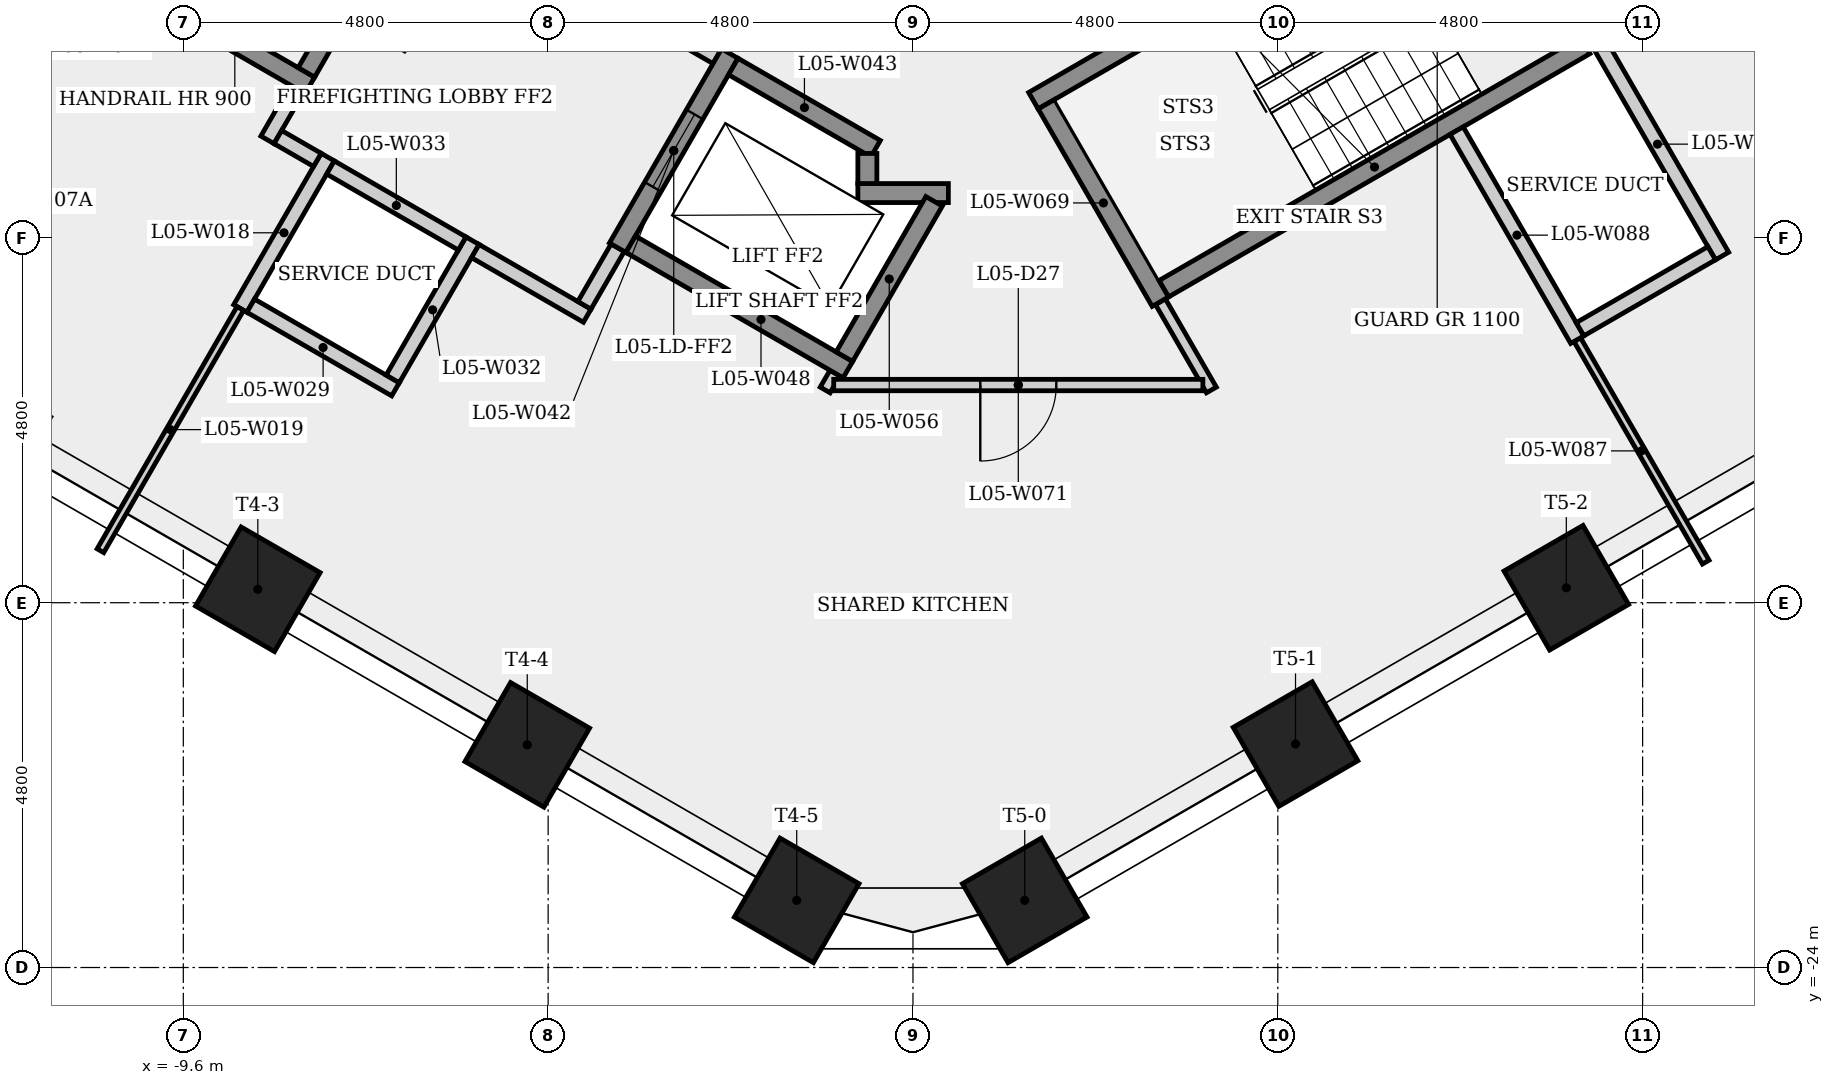
"""IFC4 building model, lengths in metres.
Left out: names, types, materials, properties, quantities, classifications, styles, units other than length and angle.
Written with IfcOpenShell. Run it as: python <this file> out.ifc"""

import sys

from ifc_helpers import new_model, si_unit, direction, frame, frame_2d, origin, origin_2d, place, context, subcontext, project, spatial, rectangle, extrude, element, fill, save


model = new_model("IFC4")
c1 = context("Model", 3, precision=1e-05, world=origin(), true_north=direction((0.0, 1.0)))
c2 = subcontext(c1, "Body", "Model", "MODEL_VIEW")
j1 = project(units=[si_unit("LENGTHUNIT", "METRE"), si_unit("PLANEANGLEUNIT", "RADIAN")], contexts=[c1])
p1 = place(None, origin())
s1 = spatial("IfcSite", under=j1, at=p1, CompositionType="ELEMENT")
p2 = place(p1, origin())
s2 = spatial("IfcBuilding", under=s1, at=p2, CompositionType="ELEMENT")
p3 = place(p2, frame((0.0, 0.0, 25.5)))
s3 = spatial("IfcBuildingStorey", under=s2, at=p3, CompositionType="ELEMENT", Elevation=25.5)
for number, where, z_axis, x_axis in (
    (1, (-8.62, -19.023, 0.0), (0.0, 0.0, 1.0), (-0.5, -0.866, 0.0)),
    (2, (-5.075, -21.07, 0.0), (0.0, 0.0, 1.0), (-0.5, -0.866, 0.0)),
    (3, (-1.53, -23.117, 0.0), (0.0, 0.0, 1.0), (-0.5, -0.866, 0.0)),
    (4, (1.47, -23.117, 0.0), (0.0, 0.0, 1.0), (0.5, -0.866, 0.0)),
    (5, (5.033, -21.06, 0.0), (0.0, 0.0, 1.0), (0.5, -0.866, 0.0)),
    (6, (8.596, -19.003, 0.0), (0.0, 0.0, 1.0), (0.5, -0.866, 0.0)),
):
    element("IfcColumn", number, at=place(p3, frame(where, z_axis=z_axis, x_axis=x_axis)), inside=s3, PredefinedType="COLUMN", context=c2, shape_type="SweptSolid", body=[
        extrude(rectangle(XDim=1.2, YDim=1.2, at=origin_2d()), origin(), (0.0, 0.0, 1.0), 3.4),
    ])
p4 = place(p3, frame((-8.85, -15.329, 0.0), z_axis=(0.0, 0.0, 1.0), x_axis=(0.500077740698, 0.865980515519, 0.0)))
e7 = element("IfcWall", 7, at=p4, inside=s3, PredefinedType="PLUMBINGWALL", context=c2, shape_type="SweptSolid", body=[
    extrude(rectangle(XDim=2.3, YDim=0.2, at=frame_2d((1.15, 0.0))), origin(), (0.0, 0.0, 1.0), 3.05),
])
p5 = place(p3, frame((-8.85, -15.329, 0.0), z_axis=(0.0, 0.0, 1.0), x_axis=(-0.499955964762, -0.866050826049, 0.0)))
e8 = element("IfcWall", 8, at=p5, inside=s3, PredefinedType="PARTITIONING", context=c2, shape_type="SweptSolid", body=[
    extrude(rectangle(XDim=3.68, YDim=0.1, at=frame_2d((1.84, 0.0))), origin(), (0.0, 0.0, 1.0), 3.05),
])
p6 = place(p3, frame((-8.493, -13.11, 0.0), z_axis=(0.0, 0.0, 1.0), x_axis=(0.500067724834, 0.865986299303, 0.0)))
e9 = element("IfcWall", 9, at=p6, inside=s3, PredefinedType="PARTITIONING", context=c2, shape_type="SweptSolid", body=[
    extrude(rectangle(XDim=0.775, YDim=0.2, at=frame_2d((0.388, 0.0))), origin(), (0.0, 0.0, 1.0), 3.05),
])
p7 = place(p3, frame((-7.935, -12.393, 0.0), z_axis=(0.0, 0.0, 1.0), x_axis=(-0.866025499775, 0.499999833739, 0.0)))
e10 = element("IfcWall", 10, at=p7, inside=s3, PredefinedType="SHEAR", context=c2, shape_type="SweptSolid", body=[
    extrude(rectangle(XDim=6.4, YDim=0.25, at=frame_2d((3.2, 0.0))), origin(), (0.0, 0.0, 1.0), 3.05),
])
p8 = place(p3, frame((-7.836, -13.373, 0.0), z_axis=(0.0, 0.0, 1.0), x_axis=(-0.866232998003, 0.499640263761, 0.0)))
e11 = element("IfcWall", 11, at=p8, inside=s3, PredefinedType="PARTITIONING", context=c2, shape_type="SweptSolid", body=[
    extrude(rectangle(XDim=0.6, YDim=0.2, at=frame_2d((0.3, 0.0))), origin(), (0.0, 0.0, 1.0), 3.05),
])
p9 = place(p3, frame((-6.808, -16.392, 0.0), z_axis=(0.0, 0.0, 1.0), x_axis=(-0.866008176907, 0.50002983664, 0.0)))
e12 = element("IfcWall", 12, at=p9, inside=s3, PredefinedType="PLUMBINGWALL", context=c2, shape_type="SweptSolid", body=[
    extrude(rectangle(XDim=2.2, YDim=0.2, at=frame_2d((1.1, 0.0))), origin(), (0.0, 0.0, 1.0), 3.05),
])
p10 = place(p3, frame((-6.605, -9.841, 0.0), z_axis=(0.0, 0.0, 1.0), x_axis=(-0.499996545922, -0.866027397988, 0.0)))
e13 = element("IfcWall", 13, at=p10, inside=s3, PredefinedType="SHEAR", context=c2, shape_type="SweptSolid", body=[
    extrude(rectangle(XDim=2.75, YDim=0.25, at=frame_2d((1.375, 0.0))), origin(), (0.0, 0.0, 1.0), 3.05),
])
p11 = place(p10, frame((0.875, 0.0, 0.0)))
e14 = element("IfcOpeningElement", 14, at=p11, cuts=e13, PredefinedType="OPENING", context=c2, shape_type="SweptSolid", body=[
    extrude(rectangle(XDim=1.0, YDim=2.1, at=frame_2d((0.5, 1.05))), frame((0.0, 0.135, 0.0), z_axis=(0.0, -1.0, 0.0), x_axis=(1.0, 0.0, 0.0)), (0.0, 0.0, 1.0), 0.27),
])
p12 = place(p3, frame((-6.435, -9.795, 0.0), z_axis=(0.0, 0.0, 1.0), x_axis=(0.866012907634, -0.500021643343, 0.0)))
e15 = element("IfcWall", 15, at=p12, inside=s3, PredefinedType="PARTITIONING", context=c2, shape_type="SweptSolid", body=[
    extrude(rectangle(XDim=4.45, YDim=0.2, at=frame_2d((2.225, 0.0))), origin(), (0.0, 0.0, 1.0), 3.05),
])
p13 = place(p12, frame((1.675, 0.0, 0.0)))
e16 = element("IfcOpeningElement", 16, at=p13, cuts=e15, PredefinedType="OPENING", context=c2, shape_type="SweptSolid", body=[
    extrude(rectangle(XDim=1.1, YDim=2.1, at=frame_2d((0.55, 1.05))), frame((0.0, 0.11, 0.0), z_axis=(0.0, -1.0, 0.0), x_axis=(1.0, 0.0, 0.0)), (0.0, 0.0, 1.0), 0.22),
])
p14 = place(p3, frame((-5.795, -14.437, 0.0), z_axis=(0.0, 0.0, 1.0), x_axis=(-0.500027713859, -0.866009402589, 0.0)))
e17 = element("IfcWall", 17, at=p14, inside=s3, PredefinedType="PLUMBINGWALL", context=c2, shape_type="SweptSolid", body=[
    extrude(rectangle(XDim=2.1, YDim=0.2, at=frame_2d((1.05, 0.0))), origin(), (0.0, 0.0, 1.0), 3.05),
])
p15 = place(p3, frame((-5.931, -14.473, 0.0), z_axis=(0.0, 0.0, 1.0), x_axis=(-0.866041268327, 0.499972520799, 0.0)))
e18 = element("IfcWall", 18, at=p15, inside=s3, PredefinedType="PLUMBINGWALL", context=c2, shape_type="SweptSolid", body=[
    extrude(rectangle(XDim=2.0, YDim=0.2, at=frame_2d((1.0, 0.0))), origin(), (0.0, 0.0, 1.0), 3.05),
])
p16 = place(p3, frame((-4.286, -15.423, 0.0), z_axis=(0.0, 0.0, 1.0), x_axis=(-0.866025371046, 0.500000056704, 0.0)))
e19 = element("IfcWall", 19, at=p16, inside=s3, PredefinedType="PARTITIONING", context=c2, shape_type="SweptSolid", body=[
    extrude(rectangle(XDim=1.7, YDim=0.2, at=frame_2d((0.85, 0.0))), origin(), (0.0, 0.0, 1.0), 3.05),
])
p17 = place(p3, frame((-3.885, -14.529, 0.0), z_axis=(0.0, 0.0, 1.0), x_axis=(-0.499859285417, -0.866106630146, 0.0)))
e20 = element("IfcWall", 20, at=p17, inside=s3, PredefinedType="PARTITIONING", context=c2, shape_type="SweptSolid", body=[
    extrude(rectangle(XDim=0.875, YDim=0.2, at=frame_2d((0.438, 0.0))), origin(), (0.0, 0.0, 1.0), 3.05),
])
p18 = place(p3, frame((-2.41, -11.974, 0.0), z_axis=(0.0, 0.0, 1.0), x_axis=(-0.500001826776, -0.866024349092, 0.0)))
e21 = element("IfcWall", 21, at=p18, inside=s3, PredefinedType="SHEAR", context=c2, shape_type="SweptSolid", body=[
    extrude(rectangle(XDim=2.95, YDim=0.25, at=frame_2d((1.475, 0.0))), origin(), (0.0, 0.0, 1.0), 3.05),
])
p19 = place(p18, frame((0.925, 0.0, 0.0)))
e22 = element("IfcOpeningElement", 22, at=p19, cuts=e21, PredefinedType="OPENING", context=c2, shape_type="SweptSolid", body=[
    extrude(rectangle(XDim=1.1, YDim=2.1, at=frame_2d((0.55, 1.05))), frame((0.0, 0.135, 0.0), z_axis=(0.0, -1.0, 0.0), x_axis=(1.0, 0.0, 0.0)), (0.0, 0.0, 1.0), 0.27),
])
p20 = place(p3, frame((-2.364, -12.145, 0.0), z_axis=(0.0, 0.0, 1.0), x_axis=(0.86603892542, -0.499976579108, 0.0)))
e23 = element("IfcWall", 23, at=p20, inside=s3, PredefinedType="SHEAR", context=c2, shape_type="SweptSolid", body=[
    extrude(rectangle(XDim=2.162, YDim=0.25, at=frame_2d((1.081, 0.0))), origin(), (0.0, 0.0, 1.0), 3.05),
])
p21 = place(p3, frame((-1.155, -16.401, 0.0), z_axis=(0.0, 0.0, 1.0), x_axis=(0.500134748329, 0.865947592822, 0.0)))
e24 = element("IfcWall", 24, at=p21, inside=s3, PredefinedType="PARTITIONING", context=c2, shape_type="SweptSolid", body=[
    extrude(rectangle(XDim=0.256, YDim=0.15, at=frame_2d((0.128, 0.0))), origin(), (0.0, 0.0, 1.0), 3.05),
])
p22 = place(p3, frame((-0.856, -16.133, 0.0), z_axis=(0.0, 0.0, 1.0), x_axis=(-0.866021716278, 0.500006386895, 0.0)))
e25 = element("IfcWall", 25, at=p22, inside=s3, PredefinedType="SHEAR", context=c2, shape_type="SweptSolid", body=[
    extrude(rectangle(XDim=3.3, YDim=0.25, at=frame_2d((1.65, 0.0))), origin(), (0.0, 0.0, 1.0), 3.05),
])
p23 = place(p3, frame((-0.725, -13.81, 0.0), z_axis=(0.0, 0.0, 1.0), x_axis=(1.0, 0.0, 0.0)))
e26 = element("IfcWall", 26, at=p23, inside=s3, PredefinedType="SHEAR", context=c2, shape_type="SweptSolid", body=[
    extrude(rectangle(XDim=1.191, YDim=0.25, at=frame_2d((0.595, 0.0))), origin(), (0.0, 0.0, 1.0), 3.05),
])
p24 = place(p3, frame((-0.6, -13.289, 0.0), z_axis=(0.0, 0.0, 1.0), x_axis=(0.0, -1.0, 0.0)))
e27 = element("IfcWall", 27, at=p24, inside=s3, PredefinedType="SHEAR", context=c2, shape_type="SweptSolid", body=[
    extrude(rectangle(XDim=0.396, YDim=0.25, at=frame_2d((0.198, 0.0))), origin(), (0.0, 0.0, 1.0), 3.4),
])
p25 = place(p3, frame((0.278, -13.918, 0.0), z_axis=(0.0, 0.0, 1.0), x_axis=(-0.49998806882, -0.866032292145, 0.0)))
e28 = element("IfcWall", 28, at=p25, inside=s3, PredefinedType="SHEAR", context=c2, shape_type="SweptSolid", body=[
    extrude(rectangle(XDim=2.36, YDim=0.25, at=frame_2d((1.18, 0.0))), origin(), (0.0, 0.0, 1.0), 3.4),
])
p26 = place(p3, frame((1.585, -12.595, 0.0), z_axis=(0.0, 0.0, 1.0), x_axis=(0.866036417653, 0.499980922934, 0.0)))
e29 = element("IfcWall", 29, at=p26, inside=s3, PredefinedType="SHEAR", context=c2, shape_type="SweptSolid", body=[
    extrude(rectangle(XDim=6.65, YDim=0.25, at=frame_2d((3.325, 0.0))), origin(), (0.0, 0.0, 1.0), 3.05),
])
p27 = place(p26, frame((5.275, 0.0, 0.0)))
e30 = element("IfcOpeningElement", 30, at=p27, cuts=e29, PredefinedType="OPENING", context=c2, shape_type="SweptSolid", body=[
    extrude(rectangle(XDim=1.0, YDim=2.1, at=frame_2d((0.5, 1.05))), frame((0.0, 0.135, 0.0), z_axis=(0.0, -1.0, 0.0), x_axis=(1.0, 0.0, 0.0)), (0.0, 0.0, 1.0), 0.27),
])
p28 = place(p3, frame((3.256, -15.239, 0.0), z_axis=(0.0, 0.0, 1.0), x_axis=(0.499974444137, -0.866040157966, 0.0)))
e31 = element("IfcWall", 31, at=p28, inside=s3, PredefinedType="PARTITIONING", context=c2, shape_type="SweptSolid", body=[
    extrude(rectangle(XDim=1.342, YDim=0.15, at=frame_2d((0.671, 0.0))), origin(), (0.0, 0.0, 1.0), 3.05),
])
p29 = place(p3, frame((3.256, -15.239, 0.0), z_axis=(0.0, 0.0, 1.0), x_axis=(-0.50002537861, 0.866010750942, 0.0)))
e32 = element("IfcWall", 32, at=p29, inside=s3, PredefinedType="SHEAR", context=c2, shape_type="SweptSolid", body=[
    extrude(rectangle(XDim=3.0, YDim=0.25, at=frame_2d((1.5, 0.0))), origin(), (0.0, 0.0, 1.0), 3.05),
])
p30 = place(p3, frame((3.814, -16.336, 0.0), z_axis=(0.0, 0.0, 1.0), x_axis=(-1.0, 0.0, 0.0)))
e33 = element("IfcWall", 33, at=p30, inside=s3, PredefinedType="PARTITIONING", context=c2, shape_type="SweptSolid", body=[
    extrude(rectangle(XDim=4.857, YDim=0.15, at=frame_2d((2.428, 0.0))), origin(), (0.0, 0.0, 1.0), 3.05),
])
p31 = place(p30, frame((1.928, 0.0, 0.0)))
e34 = element("IfcOpeningElement", 34, at=p31, cuts=e33, PredefinedType="OPENING", context=c2, shape_type="SweptSolid", body=[
    extrude(rectangle(XDim=1.0, YDim=2.1, at=frame_2d((0.5, 1.05))), frame((0.0, 0.085, 0.0), z_axis=(0.0, -1.0, 0.0), x_axis=(1.0, 0.0, 0.0)), (0.0, 0.0, 1.0), 0.17),
])
p32 = place(p3, frame((3.301, -15.068, 0.0), z_axis=(0.0, 0.0, 1.0), x_axis=(0.866035036182, 0.499983315828, 0.0)))
e35 = element("IfcWall", 35, at=p32, inside=s3, PredefinedType="SHEAR", context=c2, shape_type="SweptSolid", body=[
    extrude(rectangle(XDim=6.4, YDim=0.25, at=frame_2d((3.2, 0.0))), origin(), (0.0, 0.0, 1.0), 3.05),
])
p33 = place(p3, frame((8.74, -15.738, 0.0), z_axis=(0.0, 0.0, 1.0), x_axis=(0.4999912383, -0.866030462295, 0.0)))
e36 = element("IfcWall", 36, at=p33, inside=s3, PredefinedType="PARTITIONING", context=c2, shape_type="SweptSolid", body=[
    extrude(rectangle(XDim=3.381, YDim=0.1, at=frame_2d((1.69, 0.0))), origin(), (0.0, 0.0, 1.0), 3.05),
])
p34 = place(p3, frame((8.74, -15.739, 0.0), z_axis=(0.0, 0.0, 1.0), x_axis=(-0.500017526161, 0.866015284814, 0.0)))
e37 = element("IfcWall", 37, at=p34, inside=s3, PredefinedType="PLUMBINGWALL", context=c2, shape_type="SweptSolid", body=[
    extrude(rectangle(XDim=3.175, YDim=0.2, at=frame_2d((1.588, 0.0))), origin(), (0.0, 0.0, 1.0), 3.05),
])
p35 = place(p3, frame((8.945, -11.694, 0.0), z_axis=(0.0, 0.0, 1.0), x_axis=(0.500062241894, -0.865989465428, 0.0)))
e38 = element("IfcWall", 38, at=p35, inside=s3, PredefinedType="PLUMBINGWALL", context=c2, shape_type="SweptSolid", body=[
    extrude(rectangle(XDim=3.4, YDim=0.2, at=frame_2d((1.7, 0.0))), origin(), (0.0, 0.0, 1.0), 3.05),
])
p36 = place(p3, frame((10.509, -14.602, 0.0), z_axis=(0.0, 0.0, 1.0), x_axis=(-0.866010750942, -0.50002537861, 0.0)))
e39 = element("IfcWall", 39, at=p36, inside=s3, PredefinedType="PLUMBINGWALL", context=c2, shape_type="SweptSolid", body=[
    extrude(rectangle(XDim=2.0, YDim=0.2, at=frame_2d((1.0, 0.0))), origin(), (0.0, 0.0, 1.0), 3.05),
])
p37 = place(p3, frame((12.587, -13.401, 0.0), z_axis=(0.0, 0.0, 1.0), x_axis=(-0.499952049853, 0.866053086045, 0.0)))
e40 = element("IfcWall", 40, at=p37, inside=s3, PredefinedType="PARTITIONING", context=c2, shape_type="SweptSolid", body=[
    extrude(rectangle(XDim=3.099, YDim=0.15, at=frame_2d((1.549, 0.0))), origin(), (0.0, 0.0, 1.0), 3.05),
])
p38 = place(p19, origin())
e41 = element("IfcDoor", 41, at=p38, inside=s3, OperationType="SLIDING_TO_LEFT", PredefinedType="DOOR", context=c2, shape_type="SweptSolid", body=[
    extrude(rectangle(XDim=1.1, YDim=2.1, at=frame_2d((0.55, 1.05))), frame((0.0, 0.025, 0.0), z_axis=(0.0, -1.0, 0.0), x_axis=(1.0, 0.0, 0.0)), (0.0, 0.0, 1.0), 0.05),
])
fill(e22, e41)
p39 = place(p31, origin())
e42 = element("IfcDoor", 42, at=p39, inside=s3, OperationType="SINGLE_SWING_RIGHT", PredefinedType="DOOR", context=c2, shape_type="SweptSolid", body=[
    extrude(rectangle(XDim=1.0, YDim=2.1, at=frame_2d((0.5, 1.05))), frame((0.0, 0.025, 0.0), z_axis=(0.0, -1.0, 0.0), x_axis=(1.0, 0.0, 0.0)), (0.0, 0.0, 1.0), 0.05),
])
fill(e34, e42)
save(model, sys.argv[1])
